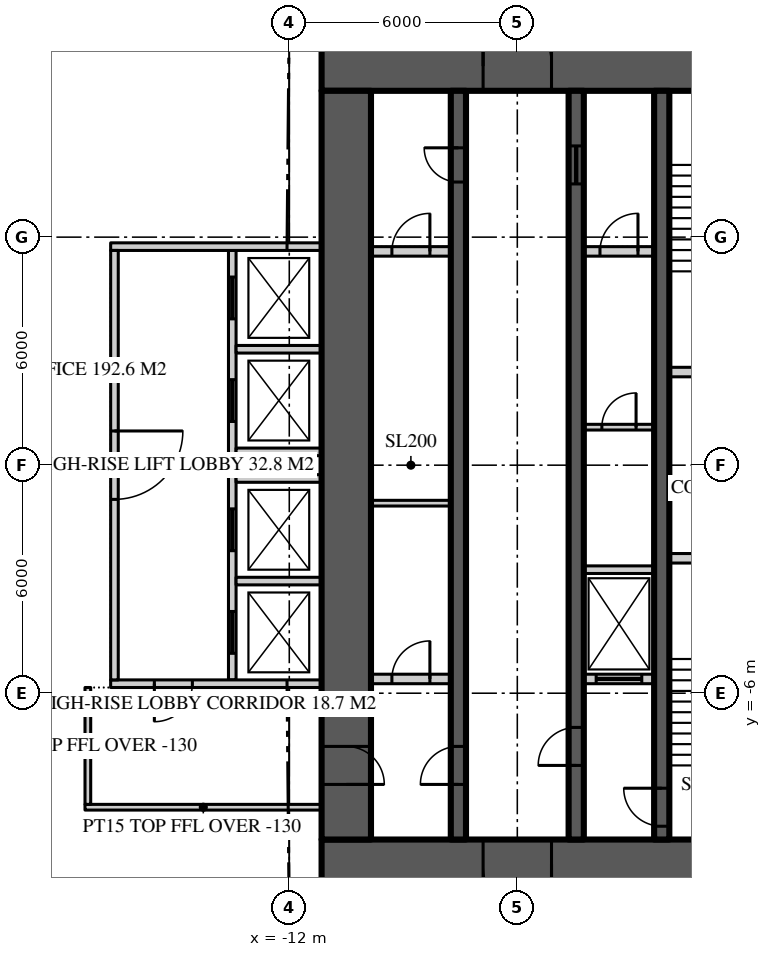
"""IFC4 building model, lengths in metres.
Left out: names, types, materials, properties, quantities, classifications, styles, units other than length and angle.
Written with IfcOpenShell. Run it as: python <this file> out.ifc"""

import sys

from ifc_helpers import new_model, si_unit, direction, frame, frame_2d, origin, place, context, subcontext, project, spatial, rectangle, extrude, element, fill, save


model = new_model("IFC4")
c1 = context("Model", 3, precision=1e-05, world=origin(), true_north=direction((0.0, 1.0)))
c2 = subcontext(c1, "Body", "Model", "MODEL_VIEW")
j1 = project(units=[si_unit("LENGTHUNIT", "METRE"), si_unit("PLANEANGLEUNIT", "RADIAN")], contexts=[c1])
p1 = place(None, origin())
s1 = spatial("IfcSite", under=j1, at=p1, CompositionType="ELEMENT")
p2 = place(p1, origin())
s2 = spatial("IfcBuilding", under=s1, at=p2, CompositionType="ELEMENT")
p3 = place(p2, frame((0.0, 0.0, 224.4)))
s3 = spatial("IfcBuildingStorey", under=s2, at=p3, CompositionType="ELEMENT", Elevation=224.4)
p4 = place(p3, frame((-11.15, 10.5, 0.0), z_axis=(0.0, 0.0, 1.0), x_axis=(1.0, 0.0, 0.0)))
e1 = element("IfcWall", 1, at=p4, inside=s3, PredefinedType="SHEAR", context=c2, shape_type="SweptSolid", body=[
    extrude(rectangle(XDim=22.3, YDim=1.3, at=frame_2d((11.15, 0.0))), origin(), (0.0, 0.0, 1.0), 3.9),
])
p5 = place(p4, frame((4.25, 0.0, 0.0)))
e2 = element("IfcOpeningElement", 2, at=p5, cuts=e1, PredefinedType="OPENING", context=c2, shape_type="SweptSolid", body=[
    extrude(rectangle(XDim=1.8, YDim=2.2, at=frame_2d((0.9, 1.1))), frame((0.0, 0.66, 0.0), z_axis=(0.0, -1.0, 0.0), x_axis=(1.0, 0.0, 0.0)), (0.0, 0.0, 1.0), 1.32),
])
p6 = place(p4, frame((16.25, 0.0, 0.0)))
e3 = element("IfcOpeningElement", 3, at=p6, cuts=e1, PredefinedType="OPENING", context=c2, shape_type="SweptSolid", body=[
    extrude(rectangle(XDim=1.8, YDim=2.2, at=frame_2d((0.9, 1.1))), frame((0.0, 0.66, 0.0), z_axis=(0.0, -1.0, 0.0), x_axis=(1.0, 0.0, 0.0)), (0.0, 0.0, 1.0), 1.32),
])
p7 = place(p3, frame((11.15, -10.5, 0.0), z_axis=(0.0, 0.0, 1.0), x_axis=(-1.0, 0.0, 0.0)))
e4 = element("IfcWall", 4, at=p7, inside=s3, PredefinedType="SHEAR", context=c2, shape_type="SweptSolid", body=[
    extrude(rectangle(XDim=22.3, YDim=1.3, at=frame_2d((11.15, 0.0))), origin(), (0.0, 0.0, 1.0), 3.9),
])
p8 = place(p7, frame((16.25, 0.0, 0.0)))
e5 = element("IfcOpeningElement", 5, at=p8, cuts=e4, PredefinedType="OPENING", context=c2, shape_type="SweptSolid", body=[
    extrude(rectangle(XDim=1.8, YDim=2.2, at=frame_2d((0.9, 1.1))), frame((0.0, 0.66, 0.0), z_axis=(0.0, -1.0, 0.0), x_axis=(1.0, 0.0, 0.0)), (0.0, 0.0, 1.0), 1.32),
])
p9 = place(p7, frame((4.25, 0.0, 0.0)))
e6 = element("IfcOpeningElement", 6, at=p9, cuts=e4, PredefinedType="OPENING", context=c2, shape_type="SweptSolid", body=[
    extrude(rectangle(XDim=1.8, YDim=2.2, at=frame_2d((0.9, 1.1))), frame((0.0, 0.66, 0.0), z_axis=(0.0, -1.0, 0.0), x_axis=(1.0, 0.0, 0.0)), (0.0, 0.0, 1.0), 1.32),
])
p10 = place(p3, frame((-10.5, 9.85, 0.0), z_axis=(0.0, 0.0, 1.0), x_axis=(0.0, -1.0, 0.0)))
e7 = element("IfcWall", 7, at=p10, inside=s3, PredefinedType="SHEAR", context=c2, shape_type="SweptSolid", body=[
    extrude(rectangle(XDim=19.7, YDim=1.3, at=frame_2d((9.85, 0.0))), origin(), (0.0, 0.0, 1.0), 3.9),
])
p11 = place(p10, frame((17.25, 0.0, 0.0)))
e8 = element("IfcOpeningElement", 8, at=p11, cuts=e7, PredefinedType="OPENING", context=c2, shape_type="SweptSolid", body=[
    extrude(rectangle(XDim=1.0, YDim=2.2, at=frame_2d((0.5, 1.1))), frame((0.0, 0.66, 0.0), z_axis=(0.0, -1.0, 0.0), x_axis=(1.0, 0.0, 0.0)), (0.0, 0.0, 1.0), 1.32),
])
p12 = place(p3, frame((-7.55, -9.85, 0.0), z_axis=(0.0, 0.0, 1.0), x_axis=(0.0, 1.0, 0.0)))
e9 = element("IfcWall", 9, at=p12, inside=s3, PredefinedType="SHEAR", context=c2, shape_type="SweptSolid", body=[
    extrude(rectangle(XDim=19.7, YDim=0.4, at=frame_2d((9.85, 0.0))), origin(), (0.0, 0.0, 1.0), 3.9),
])
p13 = place(p12, frame((1.45, 0.0, 0.0)))
e10 = element("IfcOpeningElement", 10, at=p13, cuts=e9, PredefinedType="OPENING", context=c2, shape_type="SweptSolid", body=[
    extrude(rectangle(XDim=1.0, YDim=2.2, at=frame_2d((0.5, 1.1))), frame((0.0, 0.21, 0.0), z_axis=(0.0, -1.0, 0.0), x_axis=(1.0, 0.0, 0.0)), (0.0, 0.0, 1.0), 0.42),
])
p14 = place(p12, frame((17.3, 0.0, 0.0)))
e11 = element("IfcOpeningElement", 11, at=p14, cuts=e9, PredefinedType="OPENING", context=c2, shape_type="SweptSolid", body=[
    extrude(rectangle(XDim=0.9, YDim=2.1, at=frame_2d((0.45, 1.05))), frame((0.0, 0.21, 0.0), z_axis=(0.0, -1.0, 0.0), x_axis=(1.0, 0.0, 0.0)), (0.0, 0.0, 1.0), 0.42),
])
p15 = place(p3, frame((-4.45, -9.85, 0.0), z_axis=(0.0, 0.0, 1.0), x_axis=(0.0, 1.0, 0.0)))
e12 = element("IfcWall", 12, at=p15, inside=s3, PredefinedType="SHEAR", context=c2, shape_type="SweptSolid", body=[
    extrude(rectangle(XDim=19.7, YDim=0.4, at=frame_2d((9.85, 0.0))), origin(), (0.0, 0.0, 1.0), 3.9),
])
p16 = place(p15, frame((1.95, 0.0, 0.0)))
e13 = element("IfcOpeningElement", 13, at=p16, cuts=e12, PredefinedType="OPENING", context=c2, shape_type="SweptSolid", body=[
    extrude(rectangle(XDim=1.0, YDim=2.2, at=frame_2d((0.5, 1.1))), frame((0.0, 0.21, 0.0), z_axis=(0.0, -1.0, 0.0), x_axis=(1.0, 0.0, 0.0)), (0.0, 0.0, 1.0), 0.42),
])
p17 = place(p15, frame((17.25, 0.0, 0.0)))
e14 = element("IfcOpeningElement", 14, at=p17, cuts=e12, PredefinedType="OPENING", context=c2, shape_type="SweptSolid", body=[
    extrude(rectangle(XDim=1.0, YDim=2.1, at=frame_2d((0.5, 1.05))), frame((0.0, 0.21, 0.0), z_axis=(0.0, -1.0, 0.0), x_axis=(1.0, 0.0, 0.0)), (0.0, 0.0, 1.0), 0.42),
])
p18 = place(p3, frame((-2.2, -9.85, 0.0), z_axis=(0.0, 0.0, 1.0), x_axis=(0.0, 1.0, 0.0)))
e15 = element("IfcWall", 15, at=p18, inside=s3, PredefinedType="SHEAR", context=c2, shape_type="SweptSolid", body=[
    extrude(rectangle(XDim=19.7, YDim=0.4, at=frame_2d((9.85, 0.0))), origin(), (0.0, 0.0, 1.0), 3.9),
])
p19 = place(p18, frame((0.35, 0.0, 0.0)))
e16 = element("IfcOpeningElement", 16, at=p19, cuts=e15, PredefinedType="OPENING", context=c2, shape_type="SweptSolid", body=[
    extrude(rectangle(XDim=1.0, YDim=2.2, at=frame_2d((0.5, 1.1))), frame((0.0, 0.21, 0.0), z_axis=(0.0, -1.0, 0.0), x_axis=(1.0, 0.0, 0.0)), (0.0, 0.0, 1.0), 0.42),
])
p20 = place(p3, frame((-9.85, 5.625, 0.0), z_axis=(0.0, 0.0, 1.0), x_axis=(1.0, 0.0, 0.0)))
e17 = element("IfcWall", 17, at=p20, inside=s3, PredefinedType="SOLIDWALL", context=c2, shape_type="SweptSolid", body=[
    extrude(rectangle(XDim=2.1, YDim=0.25, at=frame_2d((1.05, 0.0))), origin(), (0.0, 0.0, 1.0), 3.7),
])
p21 = place(p20, frame((0.55, 0.0, 0.0)))
e18 = element("IfcOpeningElement", 18, at=p21, cuts=e17, PredefinedType="OPENING", context=c2, shape_type="SweptSolid", body=[
    extrude(rectangle(XDim=1.0, YDim=2.2, at=frame_2d((0.5, 1.1))), frame((0.0, 0.135, 0.0), z_axis=(0.0, -1.0, 0.0), x_axis=(1.0, 0.0, 0.0)), (0.0, 0.0, 1.0), 0.27),
])
p22 = place(p3, frame((-4.25, 5.625, 0.0), z_axis=(0.0, 0.0, 1.0), x_axis=(1.0, 0.0, 0.0)))
e19 = element("IfcWall", 19, at=p22, inside=s3, PredefinedType="SOLIDWALL", context=c2, shape_type="SweptSolid", body=[
    extrude(rectangle(XDim=1.85, YDim=0.25, at=frame_2d((0.925, 0.0))), origin(), (0.0, 0.0, 1.0), 3.7),
])
p23 = place(p22, frame((0.425, 0.0, 0.0)))
e20 = element("IfcOpeningElement", 20, at=p23, cuts=e19, PredefinedType="OPENING", context=c2, shape_type="SweptSolid", body=[
    extrude(rectangle(XDim=1.0, YDim=2.2, at=frame_2d((0.5, 1.1))), frame((0.0, 0.135, 0.0), z_axis=(0.0, -1.0, 0.0), x_axis=(1.0, 0.0, 0.0)), (0.0, 0.0, 1.0), 0.27),
])
p24 = place(p3, frame((-9.85, -5.625, 0.0), z_axis=(0.0, 0.0, 1.0), x_axis=(1.0, 0.0, 0.0)))
e21 = element("IfcWall", 21, at=p24, inside=s3, PredefinedType="SOLIDWALL", context=c2, shape_type="SweptSolid", body=[
    extrude(rectangle(XDim=2.1, YDim=0.25, at=frame_2d((1.05, 0.0))), origin(), (0.0, 0.0, 1.0), 3.7),
])
p25 = place(p24, frame((0.55, 0.0, 0.0)))
e22 = element("IfcOpeningElement", 22, at=p25, cuts=e21, PredefinedType="OPENING", context=c2, shape_type="SweptSolid", body=[
    extrude(rectangle(XDim=1.0, YDim=2.2, at=frame_2d((0.5, 1.1))), frame((0.0, 0.135, 0.0), z_axis=(0.0, -1.0, 0.0), x_axis=(1.0, 0.0, 0.0)), (0.0, 0.0, 1.0), 0.27),
])
p26 = place(p3, frame((-4.25, -5.625, 0.0), z_axis=(0.0, 0.0, 1.0), x_axis=(1.0, 0.0, 0.0)))
e23 = element("IfcWall", 23, at=p26, inside=s3, PredefinedType="SOLIDWALL", context=c2, shape_type="SweptSolid", body=[
    extrude(rectangle(XDim=1.85, YDim=0.25, at=frame_2d((0.925, 0.0))), origin(), (0.0, 0.0, 1.0), 3.7),
])
p27 = place(p26, frame((0.325, 0.0, 0.0)))
e24 = element("IfcOpeningElement", 24, at=p27, cuts=e23, PredefinedType="OPENING", context=c2, shape_type="SweptSolid", body=[
    extrude(rectangle(XDim=1.2, YDim=2.2, at=frame_2d((0.6, 1.1))), frame((0.0, 0.135, 0.0), z_axis=(0.0, -1.0, 0.0), x_axis=(1.0, 0.0, 0.0)), (0.0, 0.0, 1.0), 0.27),
])
for number, where, z_axis, x_axis in (
    (25, (-2.0, -2.45, 0.0), (0.0, 0.0, 1.0), (1.0, 0.0, 0.0)),
    (26, (-2.0, 2.45, 0.0), (0.0, 0.0, 1.0), (1.0, 0.0, 0.0)),
):
    element("IfcWall", number, at=place(p3, frame(where, z_axis=z_axis, x_axis=x_axis)), inside=s3, PredefinedType="SOLIDWALL", context=c2, shape_type="SweptSolid", body=[
        extrude(rectangle(XDim=4.0, YDim=0.25, at=frame_2d((2.0, 0.0))), origin(), (0.0, 0.0, 1.0), 3.7),
    ])
p28 = place(p3, frame((-4.25, -2.75, 0.0), z_axis=(0.0, 0.0, 1.0), x_axis=(1.0, 0.0, 0.0)))
e27 = element("IfcWall", 27, at=p28, inside=s3, PredefinedType="SOLIDWALL", context=c2, shape_type="SweptSolid", body=[
    extrude(rectangle(XDim=1.85, YDim=0.2, at=frame_2d((0.925, 0.0))), origin(), (0.0, 0.0, 1.0), 3.7),
])
p29 = place(p3, frame((-13.5, 5.65, 0.0), z_axis=(0.0, 0.0, 1.0), x_axis=(0.0, -1.0, 0.0)))
e28 = element("IfcWall", 28, at=p29, inside=s3, PredefinedType="SOLIDWALL", context=c2, shape_type="SweptSolid", body=[
    extrude(rectangle(XDim=11.3, YDim=0.2, at=frame_2d((5.65, 0.0))), origin(), (0.0, 0.0, 1.0), 3.7),
])
p30 = place(p29, frame((0.7, 0.0, 0.0)))
e29 = element("IfcOpeningElement", 29, at=p30, cuts=e28, PredefinedType="OPENING", context=c2, shape_type="SweptSolid", body=[
    extrude(rectangle(XDim=1.1, YDim=2.2, at=frame_2d((0.55, 1.1))), frame((0.0, 0.11, 0.0), z_axis=(0.0, -1.0, 0.0), x_axis=(1.0, 0.0, 0.0)), (0.0, 0.0, 1.0), 0.22),
])
p31 = place(p29, frame((3.4, 0.0, 0.0)))
e30 = element("IfcOpeningElement", 30, at=p31, cuts=e28, PredefinedType="OPENING", context=c2, shape_type="SweptSolid", body=[
    extrude(rectangle(XDim=1.1, YDim=2.2, at=frame_2d((0.55, 1.1))), frame((0.0, 0.11, 0.0), z_axis=(0.0, -1.0, 0.0), x_axis=(1.0, 0.0, 0.0)), (0.0, 0.0, 1.0), 0.22),
])
p32 = place(p29, frame((6.8, 0.0, 0.0)))
e31 = element("IfcOpeningElement", 31, at=p32, cuts=e28, PredefinedType="OPENING", context=c2, shape_type="SweptSolid", body=[
    extrude(rectangle(XDim=1.1, YDim=2.2, at=frame_2d((0.55, 1.1))), frame((0.0, 0.11, 0.0), z_axis=(0.0, -1.0, 0.0), x_axis=(1.0, 0.0, 0.0)), (0.0, 0.0, 1.0), 0.22),
])
p33 = place(p29, frame((9.5, 0.0, 0.0)))
e32 = element("IfcOpeningElement", 32, at=p33, cuts=e28, PredefinedType="OPENING", context=c2, shape_type="SweptSolid", body=[
    extrude(rectangle(XDim=1.1, YDim=2.2, at=frame_2d((0.55, 1.1))), frame((0.0, 0.11, 0.0), z_axis=(0.0, -1.0, 0.0), x_axis=(1.0, 0.0, 0.0)), (0.0, 0.0, 1.0), 0.22),
])
p34 = place(p3, frame((-11.15, 5.75, 0.0), z_axis=(0.0, 0.0, 1.0), x_axis=(-1.0, 0.0, 0.0)))
e33 = element("IfcWall", 33, at=p34, inside=s3, PredefinedType="SOLIDWALL", context=c2, shape_type="SweptSolid", body=[
    extrude(rectangle(XDim=5.55, YDim=0.2, at=frame_2d((2.775, 0.0))), origin(), (0.0, 0.0, 1.0), 3.7),
])
p35 = place(p3, frame((-11.15, -5.75, 0.0), z_axis=(0.0, 0.0, 1.0), x_axis=(-1.0, 0.0, 0.0)))
e34 = element("IfcWall", 34, at=p35, inside=s3, PredefinedType="SOLIDWALL", context=c2, shape_type="SweptSolid", body=[
    extrude(rectangle(XDim=5.55, YDim=0.2, at=frame_2d((2.775, 0.0))), origin(), (0.0, 0.0, 1.0), 3.7),
])
p36 = place(p35, frame((3.4, 0.0, 0.0)))
e35 = element("IfcOpeningElement", 35, at=p36, cuts=e34, PredefinedType="OPENING", context=c2, shape_type="SweptSolid", body=[
    extrude(rectangle(XDim=1.0, YDim=2.2, at=frame_2d((0.5, 1.1))), frame((0.0, 0.11, 0.0), z_axis=(0.0, -1.0, 0.0), x_axis=(1.0, 0.0, 0.0)), (0.0, 0.0, 1.0), 0.22),
])
for number, where, z_axis, x_axis in (
    (36, (-11.15, 3.05, 0.0), (0.0, 0.0, 1.0), (-1.0, 0.0, 0.0)),
    (37, (-11.15, 0.35, 0.0), (0.0, 0.0, 1.0), (-1.0, 0.0, 0.0)),
    (38, (-11.15, -0.35, 0.0), (0.0, 0.0, 1.0), (-1.0, 0.0, 0.0)),
    (39, (-11.15, -3.05, 0.0), (0.0, 0.0, 1.0), (-1.0, 0.0, 0.0)),
):
    element("IfcWall", number, at=place(p3, frame(where, z_axis=z_axis, x_axis=x_axis)), inside=s3, PredefinedType="SOLIDWALL", context=c2, shape_type="SweptSolid", body=[
        extrude(rectangle(XDim=2.25, YDim=0.2, at=frame_2d((1.125, 0.0))), origin(), (0.0, 0.0, 1.0), 3.7),
    ])
p37 = place(p3, frame((-16.6, 5.65, 0.0), z_axis=(0.0, 0.0, 1.0), x_axis=(0.0, -1.0, 0.0)))
e40 = element("IfcWall", 40, at=p37, inside=s3, PredefinedType="SOLIDWALL", context=c2, shape_type="SweptSolid", body=[
    extrude(rectangle(XDim=11.3, YDim=0.2, at=frame_2d((5.65, 0.0))), origin(), (0.0, 0.0, 1.0), 3.18),
])
p38 = place(p37, frame((4.75, 0.0, 0.0)))
e41 = element("IfcOpeningElement", 41, at=p38, cuts=e40, PredefinedType="OPENING", context=c2, shape_type="SweptSolid", body=[
    extrude(rectangle(XDim=1.8, YDim=2.2, at=frame_2d((0.9, 1.1))), frame((0.0, 0.11, 0.0), z_axis=(0.0, -1.0, 0.0), x_axis=(1.0, 0.0, 0.0)), (0.0, 0.0, 1.0), 0.22),
])
p39 = place(p3, frame((-11.15, -9.0, 0.0), z_axis=(0.0, 0.0, 1.0), x_axis=(-1.0, 0.0, 0.0)))
e42 = element("IfcWall", 42, at=p39, inside=s3, PredefinedType="PARTITIONING", context=c2, shape_type="SweptSolid", body=[
    extrude(rectangle(XDim=6.225, YDim=0.15, at=frame_2d((3.113, 0.0))), origin(), (0.0, 0.0, 1.0), 3.77),
])
p40 = place(p3, frame((-17.3, -5.85, 0.0), z_axis=(0.0, 0.0, 1.0), x_axis=(0.0, -1.0, 0.0)))
e43 = element("IfcWall", 43, at=p40, inside=s3, PredefinedType="PARTITIONING", context=c2, shape_type="SweptSolid", body=[
    extrude(rectangle(XDim=3.075, YDim=0.15, at=frame_2d((1.538, 0.0))), origin(), (0.0, 0.0, 1.0), 3.77),
])
p41 = place(p3, frame((-9.85, -1.0, 0.0), z_axis=(0.0, 0.0, 1.0), x_axis=(1.0, 0.0, 0.0)))
e44 = element("IfcWall", 44, at=p41, inside=s3, PredefinedType="SOLIDWALL", context=c2, shape_type="SweptSolid", body=[
    extrude(rectangle(XDim=2.1, YDim=0.15, at=frame_2d((1.05, 0.0))), origin(), (0.0, 0.0, 1.0), 3.77),
])
p42 = place(p3, frame((-4.25, 1.0, 0.0), z_axis=(0.0, 0.0, 1.0), x_axis=(1.0, 0.0, 0.0)))
e45 = element("IfcWall", 45, at=p42, inside=s3, PredefinedType="SOLIDWALL", context=c2, shape_type="SweptSolid", body=[
    extrude(rectangle(XDim=1.85, YDim=0.15, at=frame_2d((0.925, 0.0))), origin(), (0.0, 0.0, 1.0), 3.77),
])
p43 = place(p42, frame((0.475, 0.0, 0.0)))
e46 = element("IfcOpeningElement", 46, at=p43, cuts=e45, PredefinedType="OPENING", context=c2, shape_type="SweptSolid", body=[
    extrude(rectangle(XDim=0.9, YDim=2.1, at=frame_2d((0.45, 1.05))), frame((0.0, 0.085, 0.0), z_axis=(0.0, -1.0, 0.0), x_axis=(1.0, 0.0, 0.0)), (0.0, 0.0, 1.0), 0.17),
])
p44 = place(p5, origin())
e47 = element("IfcDoor", 47, at=p44, inside=s3, OperationType="DOUBLE_DOOR_DOUBLE_SWING", PredefinedType="DOOR", context=c2, shape_type="SweptSolid", body=[
    extrude(rectangle(XDim=1.8, YDim=2.2, at=frame_2d((0.9, 1.1))), frame((0.0, 0.025, 0.0), z_axis=(0.0, -1.0, 0.0), x_axis=(1.0, 0.0, 0.0)), (0.0, 0.0, 1.0), 0.05),
])
fill(e2, e47)
p45 = place(p8, origin())
e48 = element("IfcDoor", 48, at=p45, inside=s3, OperationType="DOUBLE_DOOR_DOUBLE_SWING", PredefinedType="DOOR", context=c2, shape_type="SweptSolid", body=[
    extrude(rectangle(XDim=1.8, YDim=2.2, at=frame_2d((0.9, 1.1))), frame((0.0, 0.025, 0.0), z_axis=(0.0, -1.0, 0.0), x_axis=(1.0, 0.0, 0.0)), (0.0, 0.0, 1.0), 0.05),
])
fill(e5, e48)
p46 = place(p13, origin())
e49 = element("IfcDoor", 49, at=p46, inside=s3, OperationType="SINGLE_SWING_LEFT", PredefinedType="DOOR", context=c2, shape_type="SweptSolid", body=[
    extrude(rectangle(XDim=1.0, YDim=2.2, at=frame_2d((0.5, 1.1))), frame((0.0, 0.025, 0.0), z_axis=(0.0, -1.0, 0.0), x_axis=(1.0, 0.0, 0.0)), (0.0, 0.0, 1.0), 0.05),
])
fill(e10, e49)
p47 = place(p11, origin())
e50 = element("IfcDoor", 50, at=p47, inside=s3, OperationType="SINGLE_SWING_RIGHT", PredefinedType="DOOR", context=c2, shape_type="SweptSolid", body=[
    extrude(rectangle(XDim=1.0, YDim=2.2, at=frame_2d((0.5, 1.1))), frame((0.0, 0.025, 0.0), z_axis=(0.0, -1.0, 0.0), x_axis=(1.0, 0.0, 0.0)), (0.0, 0.0, 1.0), 0.05),
])
fill(e8, e50)
p48 = place(p16, origin())
e51 = element("IfcDoor", 51, at=p48, inside=s3, OperationType="SINGLE_SWING_LEFT", PredefinedType="DOOR", context=c2, shape_type="SweptSolid", body=[
    extrude(rectangle(XDim=1.0, YDim=2.2, at=frame_2d((0.5, 1.1))), frame((0.0, 0.025, 0.0), z_axis=(0.0, -1.0, 0.0), x_axis=(1.0, 0.0, 0.0)), (0.0, 0.0, 1.0), 0.05),
])
fill(e13, e51)
p49 = place(p19, origin())
e52 = element("IfcDoor", 52, at=p49, inside=s3, OperationType="SINGLE_SWING_RIGHT", PredefinedType="DOOR", context=c2, shape_type="SweptSolid", body=[
    extrude(rectangle(XDim=1.0, YDim=2.2, at=frame_2d((0.5, 1.1))), frame((0.0, 0.025, 0.0), z_axis=(0.0, -1.0, 0.0), x_axis=(1.0, 0.0, 0.0)), (0.0, 0.0, 1.0), 0.05),
])
fill(e16, e52)
p50 = place(p14, origin())
e53 = element("IfcDoor", 53, at=p50, inside=s3, OperationType="SINGLE_SWING_RIGHT", PredefinedType="DOOR", context=c2, shape_type="SweptSolid", body=[
    extrude(rectangle(XDim=0.9, YDim=2.1, at=frame_2d((0.45, 1.05))), frame((0.0, 0.025, 0.0), z_axis=(0.0, -1.0, 0.0), x_axis=(1.0, 0.0, 0.0)), (0.0, 0.0, 1.0), 0.05),
])
fill(e11, e53)
p51 = place(p17, origin())
e54 = element("IfcDoor", 54, at=p51, inside=s3, OperationType="SLIDING_TO_LEFT", PredefinedType="DOOR", context=c2, shape_type="SweptSolid", body=[
    extrude(rectangle(XDim=1.0, YDim=2.1, at=frame_2d((0.5, 1.05))), frame((0.0, 0.025, 0.0), z_axis=(0.0, -1.0, 0.0), x_axis=(1.0, 0.0, 0.0)), (0.0, 0.0, 1.0), 0.05),
])
fill(e14, e54)
p52 = place(p27, origin())
e55 = element("IfcDoor", 55, at=p52, inside=s3, OperationType="SLIDING_TO_LEFT", PredefinedType="DOOR", context=c2, shape_type="SweptSolid", body=[
    extrude(rectangle(XDim=1.2, YDim=2.2, at=frame_2d((0.6, 1.1))), frame((0.0, 0.025, 0.0), z_axis=(0.0, -1.0, 0.0), x_axis=(1.0, 0.0, 0.0)), (0.0, 0.0, 1.0), 0.05),
])
fill(e24, e55)
p53 = place(p38, origin())
e56 = element("IfcDoor", 56, at=p53, inside=s3, OperationType="DOUBLE_DOOR_DOUBLE_SWING", PredefinedType="DOOR", context=c2, shape_type="SweptSolid", body=[
    extrude(rectangle(XDim=1.8, YDim=2.2, at=frame_2d((0.9, 1.1))), frame((0.0, 0.025, 0.0), z_axis=(0.0, -1.0, 0.0), x_axis=(1.0, 0.0, 0.0)), (0.0, 0.0, 1.0), 0.05),
])
fill(e41, e56)
p54 = place(p30, origin())
e57 = element("IfcDoor", 57, at=p54, inside=s3, OperationType="SLIDING_TO_LEFT", PredefinedType="DOOR", context=c2, shape_type="SweptSolid", body=[
    extrude(rectangle(XDim=1.1, YDim=2.2, at=frame_2d((0.55, 1.1))), frame((0.0, 0.025, 0.0), z_axis=(0.0, -1.0, 0.0), x_axis=(1.0, 0.0, 0.0)), (0.0, 0.0, 1.0), 0.05),
])
fill(e29, e57)
p55 = place(p31, origin())
e58 = element("IfcDoor", 58, at=p55, inside=s3, OperationType="SLIDING_TO_LEFT", PredefinedType="DOOR", context=c2, shape_type="SweptSolid", body=[
    extrude(rectangle(XDim=1.1, YDim=2.2, at=frame_2d((0.55, 1.1))), frame((0.0, 0.025, 0.0), z_axis=(0.0, -1.0, 0.0), x_axis=(1.0, 0.0, 0.0)), (0.0, 0.0, 1.0), 0.05),
])
fill(e30, e58)
p56 = place(p32, origin())
e59 = element("IfcDoor", 59, at=p56, inside=s3, OperationType="SLIDING_TO_LEFT", PredefinedType="DOOR", context=c2, shape_type="SweptSolid", body=[
    extrude(rectangle(XDim=1.1, YDim=2.2, at=frame_2d((0.55, 1.1))), frame((0.0, 0.025, 0.0), z_axis=(0.0, -1.0, 0.0), x_axis=(1.0, 0.0, 0.0)), (0.0, 0.0, 1.0), 0.05),
])
fill(e31, e59)
p57 = place(p33, origin())
e60 = element("IfcDoor", 60, at=p57, inside=s3, OperationType="SLIDING_TO_LEFT", PredefinedType="DOOR", context=c2, shape_type="SweptSolid", body=[
    extrude(rectangle(XDim=1.1, YDim=2.2, at=frame_2d((0.55, 1.1))), frame((0.0, 0.025, 0.0), z_axis=(0.0, -1.0, 0.0), x_axis=(1.0, 0.0, 0.0)), (0.0, 0.0, 1.0), 0.05),
])
fill(e32, e60)
p58 = place(p36, origin())
e61 = element("IfcDoor", 61, at=p58, inside=s3, OperationType="SINGLE_SWING_RIGHT", PredefinedType="DOOR", context=c2, shape_type="SweptSolid", body=[
    extrude(rectangle(XDim=1.0, YDim=2.2, at=frame_2d((0.5, 1.1))), frame((0.0, 0.025, 0.0), z_axis=(0.0, -1.0, 0.0), x_axis=(1.0, 0.0, 0.0)), (0.0, 0.0, 1.0), 0.05),
])
fill(e35, e61)
p59 = place(p21, origin())
e62 = element("IfcDoor", 62, at=p59, inside=s3, OperationType="SINGLE_SWING_RIGHT", PredefinedType="DOOR", context=c2, shape_type="SweptSolid", body=[
    extrude(rectangle(XDim=1.0, YDim=2.2, at=frame_2d((0.5, 1.1))), frame((0.0, 0.025, 0.0), z_axis=(0.0, -1.0, 0.0), x_axis=(1.0, 0.0, 0.0)), (0.0, 0.0, 1.0), 0.05),
])
fill(e18, e62)
p60 = place(p25, origin())
e63 = element("IfcDoor", 63, at=p60, inside=s3, OperationType="SINGLE_SWING_RIGHT", PredefinedType="DOOR", context=c2, shape_type="SweptSolid", body=[
    extrude(rectangle(XDim=1.0, YDim=2.2, at=frame_2d((0.5, 1.1))), frame((0.0, 0.025, 0.0), z_axis=(0.0, -1.0, 0.0), x_axis=(1.0, 0.0, 0.0)), (0.0, 0.0, 1.0), 0.05),
])
fill(e22, e63)
p61 = place(p43, origin())
e64 = element("IfcDoor", 64, at=p61, inside=s3, OperationType="SINGLE_SWING_RIGHT", PredefinedType="DOOR", context=c2, shape_type="SweptSolid", body=[
    extrude(rectangle(XDim=0.9, YDim=2.1, at=frame_2d((0.45, 1.05))), frame((0.0, 0.025, 0.0), z_axis=(0.0, -1.0, 0.0), x_axis=(1.0, 0.0, 0.0)), (0.0, 0.0, 1.0), 0.05),
])
fill(e46, e64)
p62 = place(p23, origin())
e65 = element("IfcDoor", 65, at=p62, inside=s3, OperationType="SINGLE_SWING_RIGHT", PredefinedType="DOOR", context=c2, shape_type="SweptSolid", body=[
    extrude(rectangle(XDim=1.0, YDim=2.2, at=frame_2d((0.5, 1.1))), frame((0.0, 0.025, 0.0), z_axis=(0.0, -1.0, 0.0), x_axis=(1.0, 0.0, 0.0)), (0.0, 0.0, 1.0), 0.05),
])
fill(e20, e65)
save(model, sys.argv[1])
